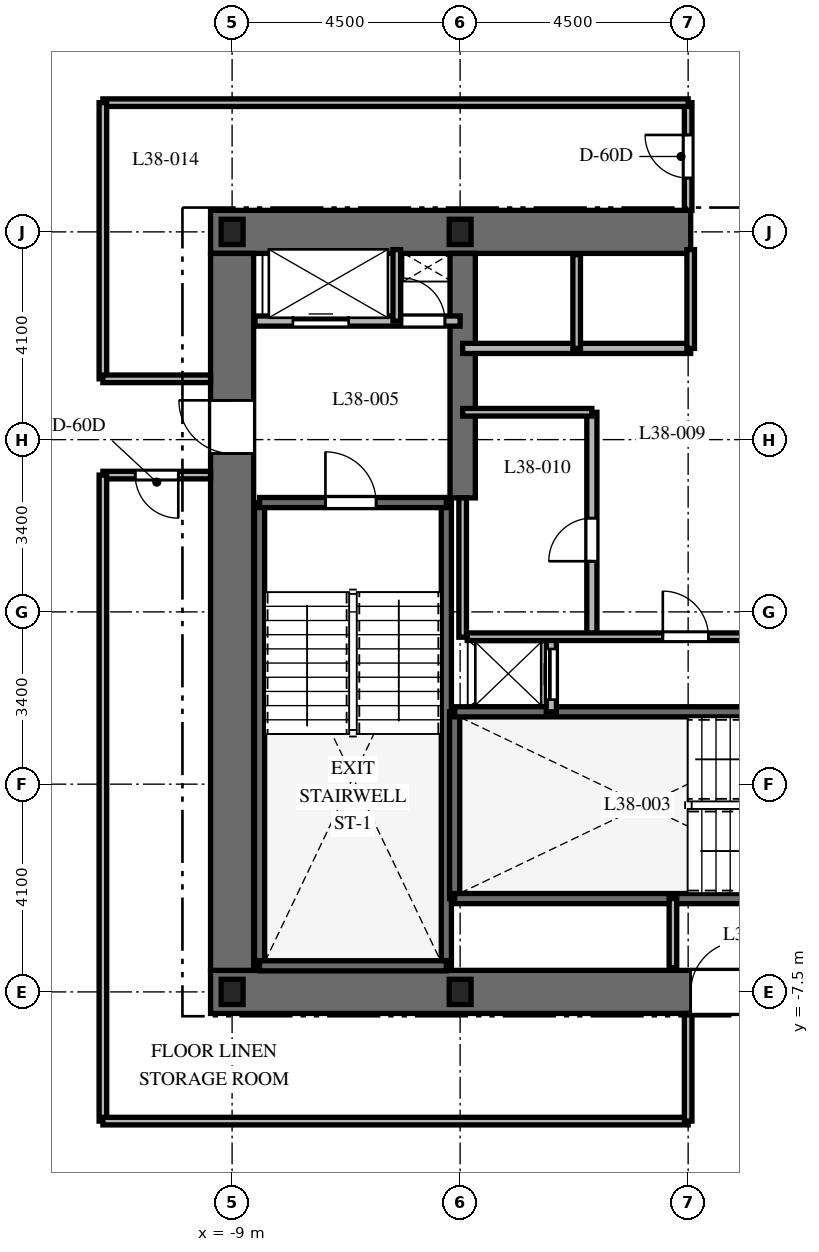
"""IFC4 building model, lengths in metres.
Left out: names, types, materials, properties, quantities, classifications, styles, units other than length and angle.
Written with IfcOpenShell. Run it as: python <this file> out.ifc"""

import sys

from ifc_helpers import new_model, si_unit, direction, frame, frame_2d, origin, origin_2d, place, context, subcontext, project, spatial, rectangle, i_section, extrude, element, fill, save


model = new_model("IFC4")
c1 = context("Model", 3, precision=1e-05, world=origin(), true_north=direction((0.0, 1.0)))
c2 = subcontext(c1, "Body", "Model", "MODEL_VIEW")
j1 = project(units=[si_unit("LENGTHUNIT", "METRE"), si_unit("PLANEANGLEUNIT", "RADIAN")], contexts=[c1])
p1 = place(None, origin())
s1 = spatial("IfcSite", under=j1, at=p1, CompositionType="ELEMENT")
p2 = place(p1, origin())
s2 = spatial("IfcBuilding", under=s1, at=p2, CompositionType="ELEMENT")
p3 = place(p2, frame((0.0, 0.0, 155.4)))
s3 = spatial("IfcBuildingStorey", under=s2, at=p3, CompositionType="ELEMENT", Elevation=155.4)
p4 = place(p3, frame((-9.425, -7.5, 0.0), z_axis=(0.0, 0.0, 1.0), x_axis=(1.0, 0.0, 0.0)))
e1 = element("IfcWall", 1, at=p4, inside=s3, PredefinedType="SHEAR", context=c2, shape_type="SweptSolid", body=[
    extrude(rectangle(XDim=18.85, YDim=0.85, at=frame_2d((9.425, 0.0))), origin(), (0.0, 0.0, 1.0), 3.7),
])
p5 = place(p4, frame((9.475, 0.0, 0.0)))
e2 = element("IfcOpeningElement", 2, at=p5, cuts=e1, PredefinedType="OPENING", context=c2, shape_type="SweptSolid", body=[
    extrude(rectangle(XDim=1.0, YDim=2.15, at=frame_2d((0.5, 1.075))), frame((0.0, 0.435, 0.0), z_axis=(0.0, -1.0, 0.0), x_axis=(1.0, 0.0, 0.0)), (0.0, 0.0, 1.0), 0.87),
])
p6 = place(p3, frame((-9.425, 7.5, 0.0), z_axis=(0.0, 0.0, 1.0), x_axis=(1.0, 0.0, 0.0)))
e3 = element("IfcWall", 3, at=p6, inside=s3, PredefinedType="SHEAR", context=c2, shape_type="SweptSolid", body=[
    extrude(rectangle(XDim=9.475, YDim=0.85, at=frame_2d((4.738, 0.0))), origin(), (0.0, 0.0, 1.0), 3.7),
])
p7 = place(p3, frame((-9.0, -7.075, 0.0), z_axis=(0.0, 0.0, 1.0), x_axis=(0.0, 1.0, 0.0)))
e4 = element("IfcWall", 4, at=p7, inside=s3, PredefinedType="SHEAR", context=c2, shape_type="SweptSolid", body=[
    extrude(rectangle(XDim=14.15, YDim=0.85, at=frame_2d((7.075, 0.0))), origin(), (0.0, 0.0, 1.0), 3.7),
])
p8 = place(p7, frame((10.2, 0.0, 0.0)))
e5 = element("IfcOpeningElement", 5, at=p8, cuts=e4, PredefinedType="OPENING", context=c2, shape_type="SweptSolid", body=[
    extrude(rectangle(XDim=1.05, YDim=2.15, at=frame_2d((0.525, 1.075))), frame((0.0, 0.435, 0.0), z_axis=(0.0, -1.0, 0.0), x_axis=(1.0, 0.0, 0.0)), (0.0, 0.0, 1.0), 0.87),
])
p9 = place(p3, frame((-4.45, 2.25, 0.0), z_axis=(0.0, 0.0, 1.0), x_axis=(0.0, 1.0, 0.0)))
e6 = element("IfcWall", 6, at=p9, inside=s3, PredefinedType="SHEAR", context=c2, shape_type="SweptSolid", body=[
    extrude(rectangle(XDim=4.825, YDim=0.5, at=frame_2d((2.413, 0.0))), origin(), (0.0, 0.0, 1.0), 3.7),
])
for number, where, z_axis, x_axis in (
    (7, (-8.458, -6.985, 0.0), (0.0, 0.0, 1.0), (0.0, 1.0, 0.0)),
    (8, (-4.772, -6.985, 0.0), (0.0, 0.0, 1.0), (0.0, 1.0, 0.0)),
):
    element("IfcWall", number, at=place(p3, frame(where, z_axis=z_axis, x_axis=x_axis)), inside=s3, PredefinedType="SHEAR", context=c2, shape_type="SweptSolid", body=[
        extrude(rectangle(XDim=9.143, YDim=0.2, at=frame_2d((4.572, 0.0))), origin(), (0.0, 0.0, 1.0), 3.7),
    ])
p10 = place(p3, frame((-8.458, -6.985, 0.0), z_axis=(0.0, 0.0, 1.0), x_axis=(1.0, 0.0, 0.0)))
e9 = element("IfcWall", 9, at=p10, inside=s3, PredefinedType="SHEAR", context=c2, shape_type="SweptSolid", body=[
    extrude(rectangle(XDim=3.686, YDim=0.2, at=frame_2d((1.843, 0.0))), origin(), (0.0, 0.0, 1.0), 3.7),
])
p11 = place(p3, frame((-8.458, 2.158, 0.0), z_axis=(0.0, 0.0, 1.0), x_axis=(1.0, 0.0, 0.0)))
e10 = element("IfcWall", 10, at=p11, inside=s3, PredefinedType="SHEAR", context=c2, shape_type="SweptSolid", body=[
    extrude(rectangle(XDim=3.686, YDim=0.2, at=frame_2d((1.843, 0.0))), origin(), (0.0, 0.0, 1.0), 3.7),
])
p12 = place(p11, frame((1.3, 0.0, 0.0)))
e11 = element("IfcOpeningElement", 11, at=p12, cuts=e10, PredefinedType="OPENING", context=c2, shape_type="SweptSolid", body=[
    extrude(rectangle(XDim=1.0, YDim=2.15, at=frame_2d((0.5, 1.075))), frame((0.0, 0.11, 0.0), z_axis=(0.0, -1.0, 0.0), x_axis=(1.0, 0.0, 0.0)), (0.0, 0.0, 1.0), 0.22),
])
p13 = place(p3, frame((-4.608, -5.658, 0.0), z_axis=(0.0, 0.0, 1.0), x_axis=(0.0, 1.0, 0.0)))
e12 = element("IfcWall", 12, at=p13, inside=s3, PredefinedType="SHEAR", context=c2, shape_type="SweptSolid", body=[
    extrude(rectangle(XDim=3.686, YDim=0.2, at=frame_2d((1.843, 0.0))), origin(), (0.0, 0.0, 1.0), 3.7),
])
p14 = place(p3, frame((-4.608, -5.658, 0.0), z_axis=(0.0, 0.0, 1.0), x_axis=(1.0, 0.0, 0.0)))
e13 = element("IfcWall", 13, at=p14, inside=s3, PredefinedType="SHEAR", context=c2, shape_type="SweptSolid", body=[
    extrude(rectangle(XDim=9.166, YDim=0.2, at=frame_2d((4.583, 0.0))), origin(), (0.0, 0.0, 1.0), 3.7),
])
p15 = place(p14, frame((7.45, 0.0, 0.0)))
e14 = element("IfcOpeningElement", 14, at=p15, cuts=e13, PredefinedType="OPENING", context=c2, shape_type="SweptSolid", body=[
    extrude(rectangle(XDim=1.0, YDim=2.15, at=frame_2d((0.5, 1.075))), frame((0.0, 0.11, 0.0), z_axis=(0.0, -1.0, 0.0), x_axis=(1.0, 0.0, 0.0)), (0.0, 0.0, 1.0), 0.22),
])
p16 = place(p3, frame((-4.608, -1.972, 0.0), z_axis=(0.0, 0.0, 1.0), x_axis=(1.0, 0.0, 0.0)))
e15 = element("IfcWall", 15, at=p16, inside=s3, PredefinedType="SHEAR", context=c2, shape_type="SweptSolid", body=[
    extrude(rectangle(XDim=9.166, YDim=0.2, at=frame_2d((4.583, 0.0))), origin(), (0.0, 0.0, 1.0), 3.7),
])
for number, where, z_axis, x_axis in (
    (16, (-9.0, -7.5, 0.0), (0.0, 0.0, 1.0), (1.0, 0.0, 0.0)),
    (17, (-4.5, -7.5, 0.0), (0.0, 0.0, 1.0), (1.0, 0.0, 0.0)),
    (18, (-4.5, 7.5, 0.0), (0.0, 0.0, 1.0), (1.0, 0.0, 0.0)),
    (19, (-9.0, 7.5, 0.0), (0.0, 0.0, 1.0), (1.0, 0.0, 0.0)),
):
    element("IfcColumn", number, at=place(p3, frame(where, z_axis=z_axis, x_axis=x_axis)), inside=s3, PredefinedType="COLUMN", context=c2, shape_type="SweptSolid", body=[
        extrude(i_section(OverallWidth=0.432, OverallDepth=0.498, WebThickness=0.056, FlangeThickness=0.089, at=origin_2d()), origin(), (0.0, 0.0, 1.0), 3.7),
    ])
p17 = place(p3, frame((-0.3, -7.02, 0.0), z_axis=(0.0, 0.0, 1.0), x_axis=(0.0, 1.0, 0.0)))
e20 = element("IfcWall", 20, at=p17, inside=s3, PredefinedType="PARTITIONING", context=c2, shape_type="SweptSolid", body=[
    extrude(rectangle(XDim=1.362, YDim=0.15, at=frame_2d((0.681, 0.0))), origin(), (0.0, 0.0, 1.0), 3.4),
])
p18 = place(p3, frame((-8.55, 5.74, 0.0), z_axis=(0.0, 0.0, 1.0), x_axis=(1.0, 0.0, 0.0)))
e21 = element("IfcWall", 21, at=p18, inside=s3, PredefinedType="PARTITIONING", context=c2, shape_type="SweptSolid", body=[
    extrude(rectangle(XDim=4.05, YDim=0.2, at=frame_2d((2.025, 0.0))), origin(), (0.0, 0.0, 1.0), 3.4),
])
p19 = place(p18, frame((0.75, 0.0, 0.0)))
e22 = element("IfcOpeningElement", 22, at=p19, cuts=e21, PredefinedType="OPENING", context=c2, shape_type="SweptSolid", body=[
    extrude(rectangle(XDim=1.1, YDim=2.2, at=frame_2d((0.55, 1.1))), frame((0.0, 0.11, 0.0), z_axis=(0.0, -1.0, 0.0), x_axis=(1.0, 0.0, 0.0)), (0.0, 0.0, 1.0), 0.22),
])
p20 = place(p18, frame((2.9, 0.0, 0.0)))
e23 = element("IfcOpeningElement", 23, at=p20, cuts=e21, PredefinedType="OPENING", context=c2, shape_type="SweptSolid", body=[
    extrude(rectangle(XDim=0.85, YDim=2.03, at=frame_2d((0.425, 1.015))), frame((0.0, 0.11, 0.0), z_axis=(0.0, -1.0, 0.0), x_axis=(1.0, 0.0, 0.0)), (0.0, 0.0, 1.0), 0.22),
])
p21 = place(p3, frame((-5.75, 5.74, 0.0), z_axis=(0.0, 0.0, 1.0), x_axis=(0.0, 1.0, 0.0)))
e24 = element("IfcWall", 24, at=p21, inside=s3, PredefinedType="PARTITIONING", context=c2, shape_type="SweptSolid", body=[
    extrude(rectangle(XDim=1.41, YDim=0.15, at=frame_2d((0.705, 0.0))), origin(), (0.0, 0.0, 1.0), 3.4),
])
p22 = place(p3, frame((-2.7, -1.972, 0.0), z_axis=(0.0, 0.0, 1.0), x_axis=(0.0, 1.0, 0.0)))
e25 = element("IfcWall", 25, at=p22, inside=s3, PredefinedType="PARTITIONING", context=c2, shape_type="SweptSolid", body=[
    extrude(rectangle(XDim=1.472, YDim=0.2, at=frame_2d((0.736, 0.0))), origin(), (0.0, 0.0, 1.0), 3.4),
])
p23 = place(p22, frame((0.24, 0.0, 0.0)))
e26 = element("IfcOpeningElement", 26, at=p23, cuts=e25, PredefinedType="OPENING", context=c2, shape_type="SweptSolid", body=[
    extrude(rectangle(XDim=1.0, YDim=2.2, at=frame_2d((0.5, 1.1))), frame((0.0, 0.11, 0.0), z_axis=(0.0, -1.0, 0.0), x_axis=(1.0, 0.0, 0.0)), (0.0, 0.0, 1.0), 0.22),
])
p24 = place(p3, frame((-4.45, 5.2, 0.0), z_axis=(0.0, 0.0, 1.0), x_axis=(1.0, 0.0, 0.0)))
e27 = element("IfcWall", 27, at=p24, inside=s3, PredefinedType="PARTITIONING", context=c2, shape_type="SweptSolid", body=[
    extrude(rectangle(XDim=4.5, YDim=0.2, at=frame_2d((2.25, 0.0))), origin(), (0.0, 0.0, 1.0), 3.4),
])
p25 = place(p3, frame((-2.2, 5.2, 0.0), z_axis=(0.0, 0.0, 1.0), x_axis=(0.0, 1.0, 0.0)))
e28 = element("IfcWall", 28, at=p25, inside=s3, PredefinedType="PARTITIONING", context=c2, shape_type="SweptSolid", body=[
    extrude(rectangle(XDim=1.85, YDim=0.15, at=frame_2d((0.925, 0.0))), origin(), (0.0, 0.0, 1.0), 3.4),
])
p26 = place(p3, frame((0.05, 5.2, 0.0), z_axis=(0.0, 0.0, 1.0), x_axis=(0.0, 1.0, 0.0)))
e29 = element("IfcWall", 29, at=p26, inside=s3, PredefinedType="PARTITIONING", context=c2, shape_type="SweptSolid", body=[
    extrude(rectangle(XDim=1.95, YDim=0.15, at=frame_2d((0.975, 0.0))), origin(), (0.0, 0.0, 1.0), 3.4),
])
p27 = place(p3, frame((-4.45, -0.5, 0.0), z_axis=(0.0, 0.0, 1.0), x_axis=(0.0, 1.0, 0.0)))
e30 = element("IfcWall", 30, at=p27, inside=s3, PredefinedType="PARTITIONING", context=c2, shape_type="SweptSolid", body=[
    extrude(rectangle(XDim=2.75, YDim=0.15, at=frame_2d((1.375, 0.0))), origin(), (0.0, 0.0, 1.0), 3.4),
])
p28 = place(p3, frame((-1.9, -0.5, 0.0), z_axis=(0.0, 0.0, 1.0), x_axis=(0.0, 1.0, 0.0)))
e31 = element("IfcWall", 31, at=p28, inside=s3, PredefinedType="PARTITIONING", context=c2, shape_type="SweptSolid", body=[
    extrude(rectangle(XDim=4.44, YDim=0.2, at=frame_2d((2.22, 0.0))), origin(), (0.0, 0.0, 1.0), 3.4),
])
p29 = place(p28, frame((1.5, 0.0, 0.0)))
e32 = element("IfcOpeningElement", 32, at=p29, cuts=e31, PredefinedType="OPENING", context=c2, shape_type="SweptSolid", body=[
    extrude(rectangle(XDim=0.85, YDim=2.03, at=frame_2d((0.425, 1.015))), frame((0.0, 0.11, 0.0), z_axis=(0.0, -1.0, 0.0), x_axis=(1.0, 0.0, 0.0)), (0.0, 0.0, 1.0), 0.22),
])
p30 = place(p3, frame((-4.45, 3.94, 0.0), z_axis=(0.0, 0.0, 1.0), x_axis=(1.0, 0.0, 0.0)))
e33 = element("IfcWall", 33, at=p30, inside=s3, PredefinedType="PARTITIONING", context=c2, shape_type="SweptSolid", body=[
    extrude(rectangle(XDim=2.55, YDim=0.15, at=frame_2d((1.275, 0.0))), origin(), (0.0, 0.0, 1.0), 3.4),
])
p31 = place(p3, frame((-4.36, -0.49, 0.0), z_axis=(0.0, 0.0, 1.0), x_axis=(1.0, 0.0, 0.0)))
e34 = element("IfcWall", 34, at=p31, inside=s3, PredefinedType="PARTITIONING", context=c2, shape_type="SweptSolid", body=[
    extrude(rectangle(XDim=8.72, YDim=0.15, at=frame_2d((4.36, 0.0))), origin(), (0.0, 0.0, 1.0), 3.4),
])
p32 = place(p31, frame((3.86, 0.0, 0.0)))
e35 = element("IfcOpeningElement", 35, at=p32, cuts=e34, PredefinedType="OPENING", context=c2, shape_type="SweptSolid", body=[
    extrude(rectangle(XDim=0.9, YDim=2.03, at=frame_2d((0.45, 1.015))), frame((0.0, 0.085, 0.0), z_axis=(0.0, -1.0, 0.0), x_axis=(1.0, 0.0, 0.0)), (0.0, 0.0, 1.0), 0.17),
])
p33 = place(p3, frame((0.0, 7.925, 0.0), z_axis=(0.0, 0.0, 1.0), x_axis=(0.0, 1.0, 0.0)))
e36 = element("IfcWall", 36, at=p33, inside=s3, PredefinedType="PARTITIONING", context=c2, shape_type="SweptSolid", body=[
    extrude(rectangle(XDim=2.125, YDim=0.15, at=frame_2d((1.062, 0.0))), origin(), (0.0, 0.0, 1.0), 3.4),
])
p34 = place(p33, frame((0.638, 0.0, 0.0)))
e37 = element("IfcOpeningElement", 37, at=p34, cuts=e36, PredefinedType="OPENING", context=c2, shape_type="SweptSolid", body=[
    extrude(rectangle(XDim=0.85, YDim=2.03, at=frame_2d((0.425, 1.015))), frame((0.0, 0.085, 0.0), z_axis=(0.0, -1.0, 0.0), x_axis=(1.0, 0.0, 0.0)), (0.0, 0.0, 1.0), 0.17),
])
p35 = place(p3, frame((0.0, 10.05, 0.0), z_axis=(0.0, 0.0, 1.0), x_axis=(-1.0, 0.0, 0.0)))
e38 = element("IfcWall", 38, at=p35, inside=s3, PredefinedType="PARTITIONING", context=c2, shape_type="SweptSolid", body=[
    extrude(rectangle(XDim=11.55, YDim=0.15, at=frame_2d((5.775, 0.0))), origin(), (0.0, 0.0, 1.0), 2.84),
])
p36 = place(p3, frame((-11.55, 10.05, 0.0), z_axis=(0.0, 0.0, 1.0), x_axis=(0.0, -1.0, 0.0)))
e39 = element("IfcWall", 39, at=p36, inside=s3, PredefinedType="PARTITIONING", context=c2, shape_type="SweptSolid", body=[
    extrude(rectangle(XDim=5.45, YDim=0.15, at=frame_2d((2.725, 0.0))), origin(), (0.0, 0.0, 1.0), 2.84),
])
p37 = place(p3, frame((-11.55, 4.6, 0.0), z_axis=(0.0, 0.0, 1.0), x_axis=(1.0, 0.0, 0.0)))
e40 = element("IfcWall", 40, at=p37, inside=s3, PredefinedType="PARTITIONING", context=c2, shape_type="SweptSolid", body=[
    extrude(rectangle(XDim=2.125, YDim=0.15, at=frame_2d((1.062, 0.0))), origin(), (0.0, 0.0, 1.0), 3.4),
])
p38 = place(p3, frame((-9.425, 2.7, 0.0), z_axis=(0.0, 0.0, 1.0), x_axis=(-1.0, 0.0, 0.0)))
e41 = element("IfcWall", 41, at=p38, inside=s3, PredefinedType="PARTITIONING", context=c2, shape_type="SweptSolid", body=[
    extrude(rectangle(XDim=2.125, YDim=0.15, at=frame_2d((1.062, 0.0))), origin(), (0.0, 0.0, 1.0), 3.4),
])
p39 = place(p38, frame((0.637, 0.0, 0.0)))
e42 = element("IfcOpeningElement", 42, at=p39, cuts=e41, PredefinedType="OPENING", context=c2, shape_type="SweptSolid", body=[
    extrude(rectangle(XDim=0.85, YDim=2.03, at=frame_2d((0.425, 1.015))), frame((0.0, 0.085, 0.0), z_axis=(0.0, -1.0, 0.0), x_axis=(1.0, 0.0, 0.0)), (0.0, 0.0, 1.0), 0.17),
])
p40 = place(p3, frame((-11.55, 2.7, 0.0), z_axis=(0.0, 0.0, 1.0), x_axis=(0.0, -1.0, 0.0)))
e43 = element("IfcWall", 43, at=p40, inside=s3, PredefinedType="PARTITIONING", context=c2, shape_type="SweptSolid", body=[
    extrude(rectangle(XDim=12.75, YDim=0.15, at=frame_2d((6.375, 0.0))), origin(), (0.0, 0.0, 1.0), 2.84),
])
p41 = place(p3, frame((-11.55, -10.05, 0.0), z_axis=(0.0, 0.0, 1.0), x_axis=(1.0, 0.0, 0.0)))
e44 = element("IfcWall", 44, at=p41, inside=s3, PredefinedType="PARTITIONING", context=c2, shape_type="SweptSolid", body=[
    extrude(rectangle(XDim=11.55, YDim=0.15, at=frame_2d((5.775, 0.0))), origin(), (0.0, 0.0, 1.0), 2.84),
])
p42 = place(p3, frame((0.0, -10.05, 0.0), z_axis=(0.0, 0.0, 1.0), x_axis=(0.0, 1.0, 0.0)))
e45 = element("IfcWall", 45, at=p42, inside=s3, PredefinedType="PARTITIONING", context=c2, shape_type="SweptSolid", body=[
    extrude(rectangle(XDim=2.125, YDim=0.15, at=frame_2d((1.062, 0.0))), origin(), (0.0, 0.0, 1.0), 3.4),
])
p43 = place(p12, origin())
e46 = element("IfcDoor", 46, at=p43, inside=s3, OperationType="SINGLE_SWING_LEFT", PredefinedType="DOOR", context=c2, shape_type="SweptSolid", body=[
    extrude(rectangle(XDim=1.0, YDim=2.15, at=frame_2d((0.5, 1.075))), frame((0.0, 0.025, 0.0), z_axis=(0.0, -1.0, 0.0), x_axis=(1.0, 0.0, 0.0)), (0.0, 0.0, 1.0), 0.05),
])
fill(e11, e46)
p44 = place(p5, origin())
e47 = element("IfcDoor", 47, at=p44, inside=s3, OperationType="SINGLE_SWING_RIGHT", PredefinedType="DOOR", context=c2, shape_type="SweptSolid", body=[
    extrude(rectangle(XDim=1.0, YDim=2.15, at=frame_2d((0.5, 1.075))), frame((0.0, 0.025, 0.0), z_axis=(0.0, -1.0, 0.0), x_axis=(1.0, 0.0, 0.0)), (0.0, 0.0, 1.0), 0.05),
])
fill(e2, e47)
p45 = place(p8, origin())
e48 = element("IfcDoor", 48, at=p45, inside=s3, OperationType="SINGLE_SWING_RIGHT", PredefinedType="DOOR", context=c2, shape_type="SweptSolid", body=[
    extrude(rectangle(XDim=1.05, YDim=2.15, at=frame_2d((0.525, 1.075))), frame((0.0, 0.025, 0.0), z_axis=(0.0, -1.0, 0.0), x_axis=(1.0, 0.0, 0.0)), (0.0, 0.0, 1.0), 0.05),
])
fill(e5, e48)
p46 = place(p19, origin())
e49 = element("IfcDoor", 49, at=p46, inside=s3, OperationType="SLIDING_TO_LEFT", PredefinedType="DOOR", context=c2, shape_type="SweptSolid", body=[
    extrude(rectangle(XDim=1.1, YDim=2.2, at=frame_2d((0.55, 1.1))), frame((0.0, 0.025, 0.0), z_axis=(0.0, -1.0, 0.0), x_axis=(1.0, 0.0, 0.0)), (0.0, 0.0, 1.0), 0.05),
])
fill(e22, e49)
p47 = place(p20, origin())
e50 = element("IfcDoor", 50, at=p47, inside=s3, OperationType="SINGLE_SWING_LEFT", PredefinedType="DOOR", context=c2, shape_type="SweptSolid", body=[
    extrude(rectangle(XDim=0.85, YDim=2.03, at=frame_2d((0.425, 1.015))), frame((0.0, 0.025, 0.0), z_axis=(0.0, -1.0, 0.0), x_axis=(1.0, 0.0, 0.0)), (0.0, 0.0, 1.0), 0.05),
])
fill(e23, e50)
p48 = place(p23, origin())
e51 = element("IfcDoor", 51, at=p48, inside=s3, OperationType="SLIDING_TO_LEFT", PredefinedType="DOOR", context=c2, shape_type="SweptSolid", body=[
    extrude(rectangle(XDim=1.0, YDim=2.2, at=frame_2d((0.5, 1.1))), frame((0.0, 0.025, 0.0), z_axis=(0.0, -1.0, 0.0), x_axis=(1.0, 0.0, 0.0)), (0.0, 0.0, 1.0), 0.05),
])
fill(e26, e51)
p49 = place(p29, origin())
e52 = element("IfcDoor", 52, at=p49, inside=s3, OperationType="SINGLE_SWING_LEFT", PredefinedType="DOOR", context=c2, shape_type="SweptSolid", body=[
    extrude(rectangle(XDim=0.85, YDim=2.03, at=frame_2d((0.425, 1.015))), frame((0.0, 0.025, 0.0), z_axis=(0.0, -1.0, 0.0), x_axis=(1.0, 0.0, 0.0)), (0.0, 0.0, 1.0), 0.05),
])
fill(e32, e52)
p50 = place(p32, origin())
e53 = element("IfcDoor", 53, at=p50, inside=s3, OperationType="SINGLE_SWING_LEFT", PredefinedType="DOOR", context=c2, shape_type="SweptSolid", body=[
    extrude(rectangle(XDim=0.9, YDim=2.03, at=frame_2d((0.45, 1.015))), frame((0.0, 0.025, 0.0), z_axis=(0.0, -1.0, 0.0), x_axis=(1.0, 0.0, 0.0)), (0.0, 0.0, 1.0), 0.05),
])
fill(e35, e53)
p51 = place(p39, origin())
e54 = element("IfcDoor", 54, at=p51, inside=s3, OperationType="SINGLE_SWING_LEFT", PredefinedType="DOOR", context=c2, shape_type="SweptSolid", body=[
    extrude(rectangle(XDim=0.85, YDim=2.03, at=frame_2d((0.425, 1.015))), frame((0.0, 0.025, 0.0), z_axis=(0.0, -1.0, 0.0), x_axis=(1.0, 0.0, 0.0)), (0.0, 0.0, 1.0), 0.05),
])
fill(e42, e54)
p52 = place(p34, origin())
e55 = element("IfcDoor", 55, at=p52, inside=s3, OperationType="SINGLE_SWING_RIGHT", PredefinedType="DOOR", context=c2, shape_type="SweptSolid", body=[
    extrude(rectangle(XDim=0.85, YDim=2.03, at=frame_2d((0.425, 1.015))), frame((0.0, 0.025, 0.0), z_axis=(0.0, -1.0, 0.0), x_axis=(1.0, 0.0, 0.0)), (0.0, 0.0, 1.0), 0.05),
])
fill(e37, e55)
save(model, sys.argv[1])
